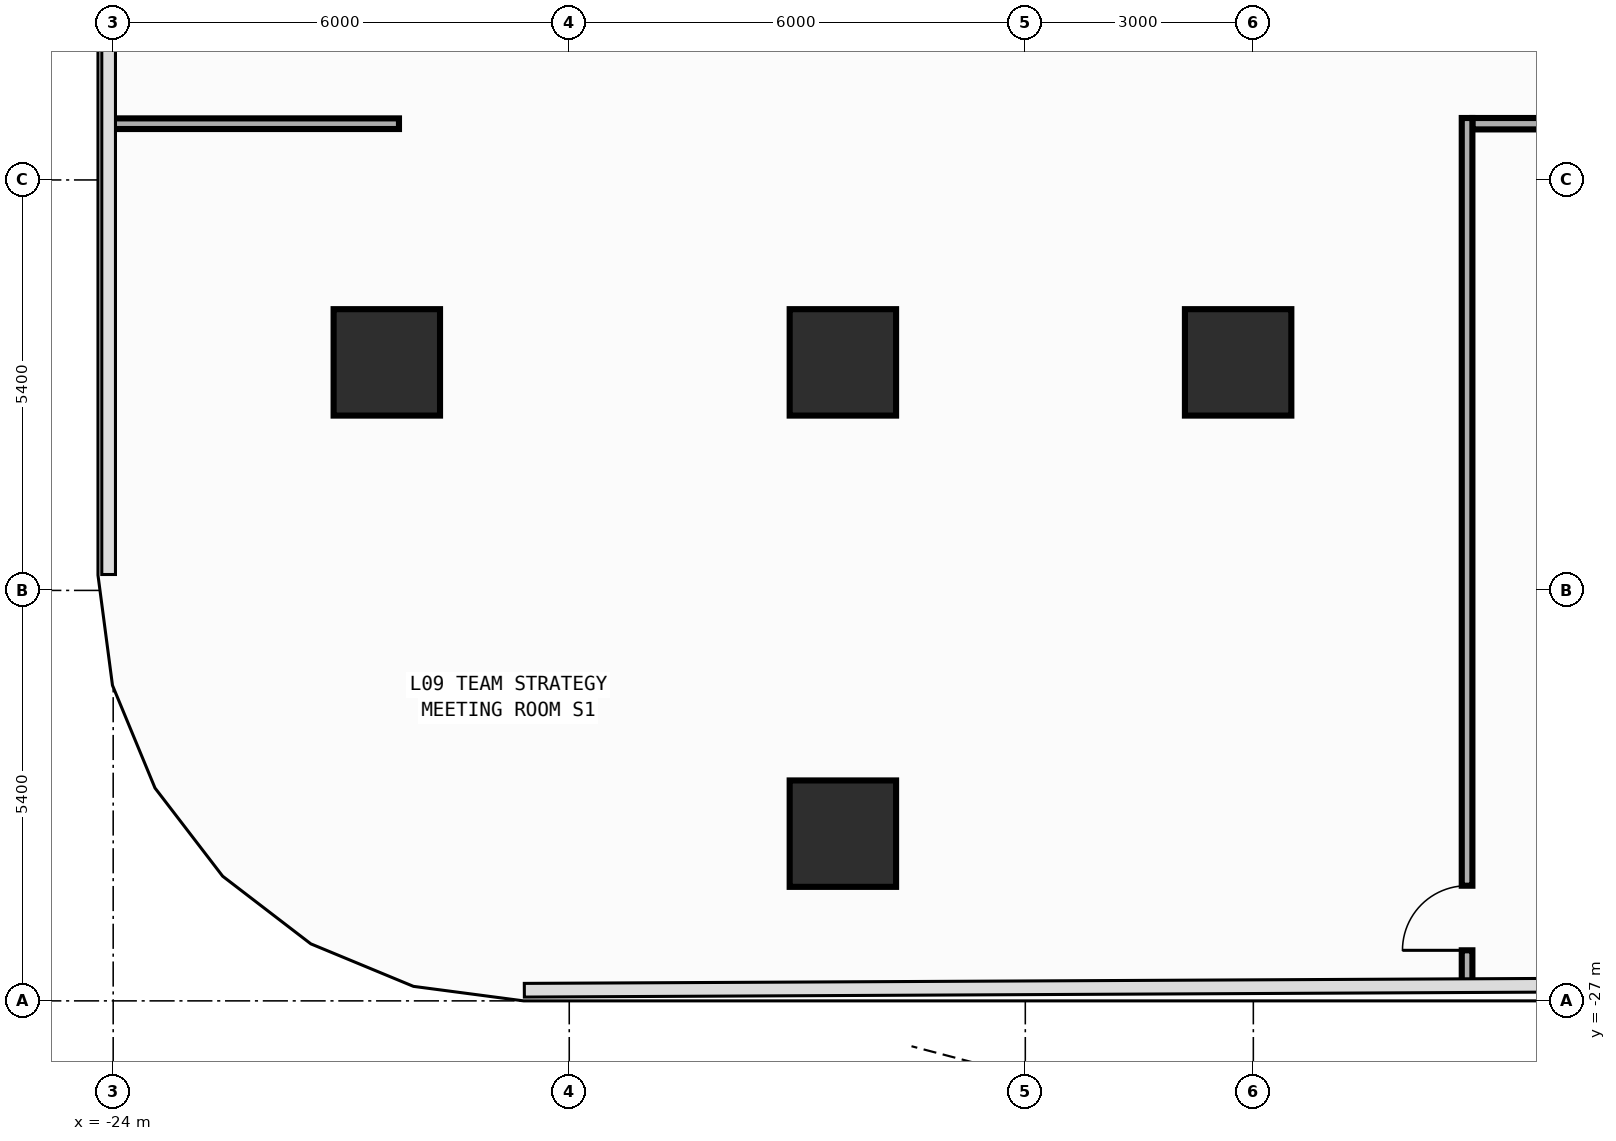
"""IFC4 building model, lengths in metres.
Left out: names, types, materials, properties, quantities, classifications, styles, units other than length and angle.
Written with IfcOpenShell. Run it as: python <this file> out.ifc"""

import sys

from ifc_helpers import new_model, si_unit, direction, frame, frame_2d, origin, origin_2d, place, context, subcontext, project, spatial, rectangle, extrude, element, fill, save


model = new_model("IFC4")
c1 = context("Model", 3, precision=1e-05, world=origin(), true_north=direction((0.0, 1.0)))
c2 = subcontext(c1, "Body", "Model", "MODEL_VIEW")
j1 = project(units=[si_unit("LENGTHUNIT", "METRE"), si_unit("PLANEANGLEUNIT", "RADIAN")], contexts=[c1])
p1 = place(None, origin())
s1 = spatial("IfcSite", under=j1, at=p1, CompositionType="ELEMENT")
p2 = place(p1, origin())
s2 = spatial("IfcBuilding", under=s1, at=p2, CompositionType="ELEMENT")
p3 = place(p2, frame((0.0, 0.0, 38.6)))
s3 = spatial("IfcBuildingStorey", under=s2, at=p3, CompositionType="ELEMENT", Elevation=38.6)
for number, where, z_axis, x_axis in (
    (1, (-9.2, -18.6, 0.0), (0.0, 0.0, 1.0), (1.0, 0.0, 0.0)),
    (2, (-20.4, -18.6, 0.0), (0.0, 0.0, 1.0), (1.0, 0.0, 0.0)),
    (3, (-14.4, -18.6, 0.0), (0.0, 0.0, 1.0), (1.0, 0.0, 0.0)),
    (4, (-14.4, -24.8, 0.0), (0.0, 0.0, 1.0), (1.0, 0.0, 0.0)),
):
    element("IfcColumn", number, at=place(p3, frame(where, z_axis=z_axis, x_axis=x_axis)), inside=s3, PredefinedType="COLUMN", context=c2, shape_type="SweptSolid", body=[
        extrude(rectangle(XDim=1.4, YDim=1.4, at=origin_2d()), origin(), (0.0, 0.0, 1.0), 4.2),
    ])
p4 = place(p3, frame((-6.118, -15.46, 0.0), z_axis=(0.0, 0.0, 1.0), x_axis=(1.0, 0.0, 0.0)))
e5 = element("IfcWall", 5, at=p4, inside=s3, PredefinedType="PARTITIONING", context=c2, shape_type="SweptSolid", body=[
    extrude(rectangle(XDim=2.833, YDim=0.15, at=frame_2d((1.417, 0.0))), origin(), (0.0, 0.0, 1.0), 3.94),
])
p5 = place(p4, frame((1.473, 0.0, 0.0)))
e6 = element("IfcOpeningElement", 6, at=p5, cuts=e5, PredefinedType="OPENING", context=c2, shape_type="SweptSolid", body=[
    extrude(rectangle(XDim=0.9, YDim=2.15, at=frame_2d((0.45, 1.075))), frame((0.0, 0.085, 0.0), z_axis=(0.0, -1.0, 0.0), x_axis=(1.0, 0.0, 0.0)), (0.0, 0.0, 1.0), 0.17),
])
p6 = place(p3, frame((-24.055, -15.46, 0.0), z_axis=(0.0, 0.0, 1.0), x_axis=(1.0, 0.0, 0.0)))
e7 = element("IfcWall", 7, at=p6, inside=s3, PredefinedType="PARTITIONING", context=c2, shape_type="SweptSolid", body=[
    extrude(rectangle(XDim=3.815, YDim=0.14, at=frame_2d((1.907, 0.0))), origin(), (0.0, 0.0, 1.0), 3.94),
])
p7 = place(p3, frame((-6.188, -26.795, 0.0), z_axis=(0.0, 0.0, 1.0), x_axis=(0.0, 1.0, 0.0)))
e8 = element("IfcWall", 8, at=p7, inside=s3, PredefinedType="PARTITIONING", context=c2, shape_type="SweptSolid", body=[
    extrude(rectangle(XDim=11.41, YDim=0.14, at=frame_2d((5.705, 0.0))), origin(), (0.0, 0.0, 1.0), 3.94),
])
p8 = place(p7, frame((0.46, 0.0, 0.0)))
e9 = element("IfcOpeningElement", 9, at=p8, cuts=e8, PredefinedType="OPENING", context=c2, shape_type="SweptSolid", body=[
    extrude(rectangle(XDim=0.85, YDim=2.1, at=frame_2d((0.425, 1.05))), frame((0.0, 0.08, 0.0), z_axis=(0.0, -1.0, 0.0), x_axis=(1.0, 0.0, 0.0)), (0.0, 0.0, 1.0), 0.16),
])
p9 = place(p8, origin())
e10 = element("IfcDoor", 10, at=p9, inside=s3, OperationType="SINGLE_SWING_LEFT", PredefinedType="DOOR", context=c2, shape_type="SweptSolid", body=[
    extrude(rectangle(XDim=0.85, YDim=2.1, at=frame_2d((0.425, 1.05))), frame((0.0, 0.025, 0.0), z_axis=(0.0, -1.0, 0.0), x_axis=(1.0, 0.0, 0.0)), (0.0, 0.0, 1.0), 0.05),
])
fill(e9, e10)
save(model, sys.argv[1])
